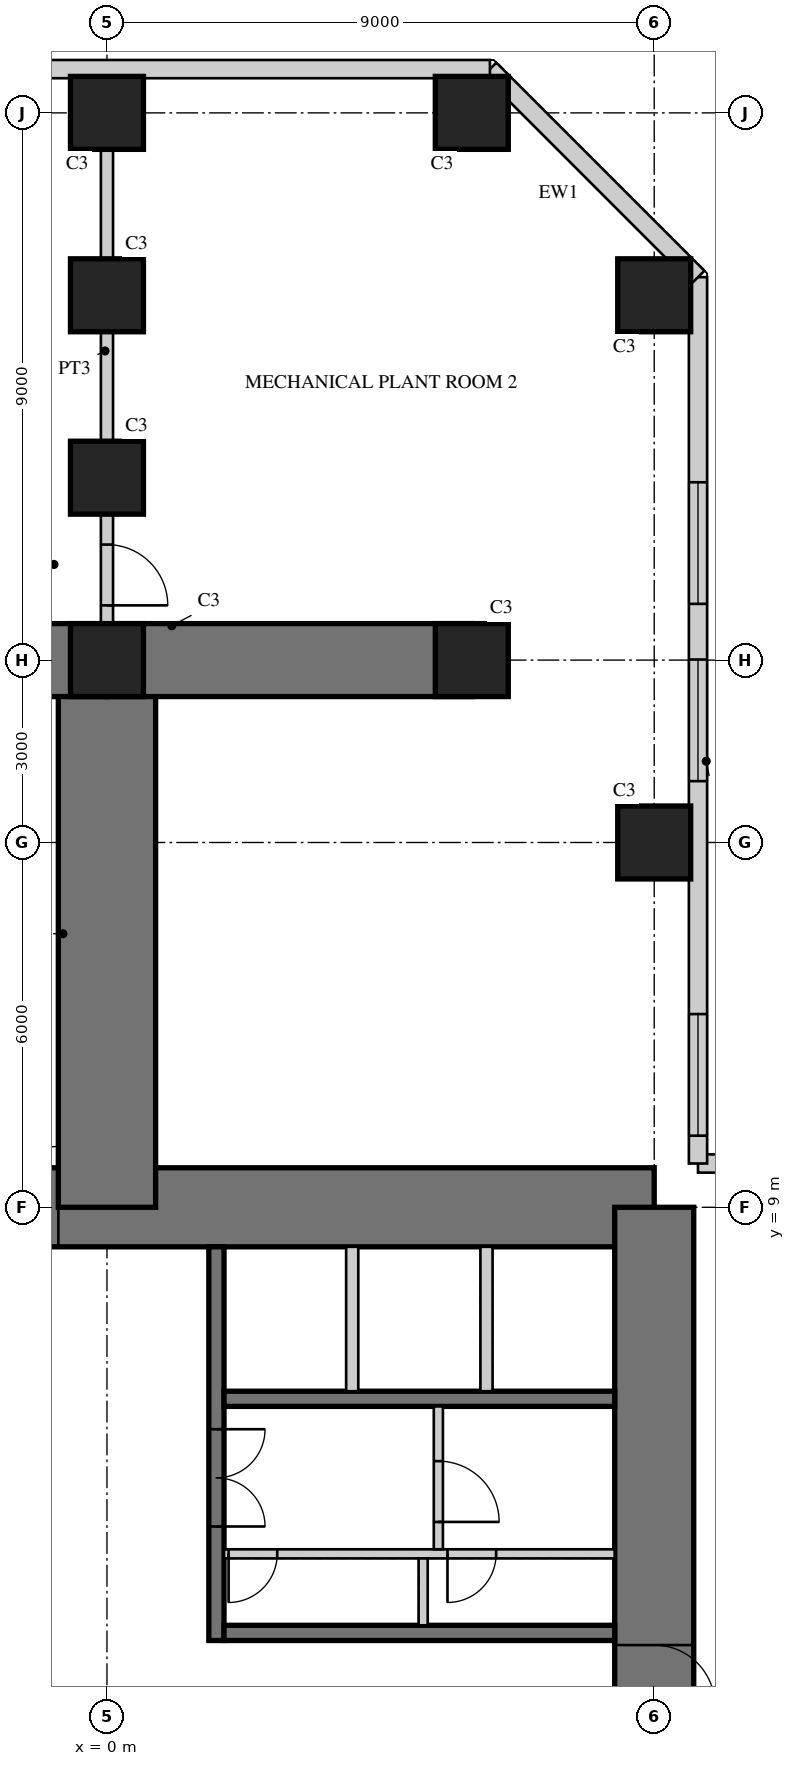
"""IFC4 building model, lengths in metres.
Left out: names, types, materials, properties, quantities, classifications, styles, units other than length and angle.
Written with IfcOpenShell. Run it as: python <this file> out.ifc"""

import sys

from ifc_helpers import new_model, si_unit, direction, frame, frame_2d, origin, origin_2d, place, context, subcontext, project, spatial, rectangle, hollow_rectangle, extrude, element, fill, save


model = new_model("IFC4")
c1 = context("Model", 3, precision=1e-05, world=origin(), true_north=direction((0.0, 1.0)))
c2 = subcontext(c1, "Body", "Model", "MODEL_VIEW")
j1 = project(units=[si_unit("LENGTHUNIT", "METRE"), si_unit("PLANEANGLEUNIT", "RADIAN")], contexts=[c1])
p1 = place(None, origin())
s1 = spatial("IfcSite", under=j1, at=p1, CompositionType="ELEMENT")
p2 = place(p1, origin())
s2 = spatial("IfcBuilding", under=s1, at=p2, CompositionType="ELEMENT")
p3 = place(p2, frame((0.0, 0.0, 18.5)))
s3 = spatial("IfcBuildingStorey", under=s2, at=p3, CompositionType="ELEMENT", Elevation=18.5)
p4 = place(p3, frame((9.0, 9.0, 0.0), z_axis=(0.0, 0.0, 1.0), x_axis=(-1.0, 0.0, 0.0)))
e1 = element("IfcWall", 1, at=p4, inside=s3, PredefinedType="SHEAR", context=c2, shape_type="SweptSolid", body=[
    extrude(rectangle(XDim=18.0, YDim=1.3, at=frame_2d((9.0, 0.0))), origin(), (0.0, 0.0, 1.0), 5.0),
])
p5 = place(p4, frame((9.8, 0.0, 0.0)))
e2 = element("IfcOpeningElement", 2, at=p5, cuts=e1, PredefinedType="OPENING", context=c2, shape_type="SweptSolid", body=[
    extrude(rectangle(XDim=1.0, YDim=2.4, at=frame_2d((0.5, 1.2))), frame((0.0, 0.66, 0.0), z_axis=(0.0, -1.0, 0.0), x_axis=(1.0, 0.0, 0.0)), (0.0, 0.0, 1.0), 1.32),
])
p6 = place(p3, frame((9.0, -9.0, 0.0), z_axis=(0.0, 0.0, 1.0), x_axis=(0.0, 1.0, 0.0)))
e3 = element("IfcWall", 3, at=p6, inside=s3, PredefinedType="SHEAR", context=c2, shape_type="SweptSolid", body=[
    extrude(rectangle(XDim=18.0, YDim=1.3, at=frame_2d((9.0, 0.0))), origin(), (0.0, 0.0, 1.0), 5.0),
])
p7 = place(p6, frame((9.8, 0.0, 0.0)))
e4 = element("IfcOpeningElement", 4, at=p7, cuts=e3, PredefinedType="OPENING", context=c2, shape_type="SweptSolid", body=[
    extrude(rectangle(XDim=1.0, YDim=2.4, at=frame_2d((0.5, 1.2))), frame((0.0, 0.66, 0.0), z_axis=(0.0, -1.0, 0.0), x_axis=(1.0, 0.0, 0.0)), (0.0, 0.0, 1.0), 1.32),
])
p8 = place(p3, frame((1.8, 1.875, 0.0), z_axis=(0.0, 0.0, 1.0), x_axis=(0.0, 1.0, 0.0)))
e5 = element("IfcWall", 5, at=p8, inside=s3, PredefinedType="SHEAR", context=c2, shape_type="SweptSolid", body=[
    extrude(rectangle(XDim=6.475, YDim=0.25, at=frame_2d((3.238, 0.0))), origin(), (0.0, 0.0, 1.0), 5.0),
])
p9 = place(p8, frame((1.875, 0.0, 0.0)))
e6 = element("IfcOpeningElement", 6, at=p9, cuts=e5, PredefinedType="OPENING", context=c2, shape_type="SweptSolid", body=[
    extrude(rectangle(XDim=1.6, YDim=2.4, at=frame_2d((0.8, 1.2))), frame((0.0, 0.135, 0.0), z_axis=(0.0, -1.0, 0.0), x_axis=(1.0, 0.0, 0.0)), (0.0, 0.0, 1.0), 0.27),
])
for number, where, z_axis, x_axis in (
    (7, (1.925, 2.0, 0.0), (0.0, 0.0, 1.0), (1.0, 0.0, 0.0)),
    (8, (1.925, 5.85, 0.0), (0.0, 0.0, 1.0), (1.0, 0.0, 0.0)),
):
    element("IfcWall", number, at=place(p3, frame(where, z_axis=z_axis, x_axis=x_axis)), inside=s3, PredefinedType="SHEAR", context=c2, shape_type="SweptSolid", body=[
        extrude(rectangle(XDim=6.425, YDim=0.25, at=frame_2d((3.212, 0.0))), origin(), (0.0, 0.0, 1.0), 5.0),
    ])
p10 = place(p3, frame((1.925, 3.3, 0.0), z_axis=(0.0, 0.0, 1.0), x_axis=(1.0, 0.0, 0.0)))
e9 = element("IfcWall", 9, at=p10, inside=s3, PredefinedType="PARTITIONING", context=c2, shape_type="SweptSolid", body=[
    extrude(rectangle(XDim=6.425, YDim=0.15, at=frame_2d((3.212, 0.0))), origin(), (0.0, 0.0, 1.0), 5.0),
])
p11 = place(p10, frame((0.075, 0.0, 0.0)))
e10 = element("IfcOpeningElement", 10, at=p11, cuts=e9, PredefinedType="OPENING", context=c2, shape_type="SweptSolid", body=[
    extrude(rectangle(XDim=0.8, YDim=2.1, at=frame_2d((0.4, 1.05))), frame((0.0, 0.085, 0.0), z_axis=(0.0, -1.0, 0.0), x_axis=(1.0, 0.0, 0.0)), (0.0, 0.0, 1.0), 0.17),
])
p12 = place(p10, frame((3.675, 0.0, 0.0)))
e11 = element("IfcOpeningElement", 11, at=p12, cuts=e9, PredefinedType="OPENING", context=c2, shape_type="SweptSolid", body=[
    extrude(rectangle(XDim=0.8, YDim=2.1, at=frame_2d((0.4, 1.05))), frame((0.0, 0.085, 0.0), z_axis=(0.0, -1.0, 0.0), x_axis=(1.0, 0.0, 0.0)), (0.0, 0.0, 1.0), 0.17),
])
p13 = place(p3, frame((5.2, 2.125, 0.0), z_axis=(0.0, 0.0, 1.0), x_axis=(0.0, 1.0, 0.0)))
e12 = element("IfcWall", 12, at=p13, inside=s3, PredefinedType="PARTITIONING", context=c2, shape_type="SweptSolid", body=[
    extrude(rectangle(XDim=1.1, YDim=0.15, at=frame_2d((0.55, 0.0))), origin(), (0.0, 0.0, 1.0), 5.0),
])
for number, where, z_axis, x_axis in (
    (13, (4.033, 5.975, 0.0), (0.0, 0.0, 1.0), (0.0, 1.0, 0.0)),
    (14, (6.242, 5.975, 0.0), (0.0, 0.0, 1.0), (0.0, 1.0, 0.0)),
):
    element("IfcWall", number, at=place(p3, frame(where, z_axis=z_axis, x_axis=x_axis)), inside=s3, PredefinedType="PARTITIONING", context=c2, shape_type="SweptSolid", body=[
        extrude(rectangle(XDim=2.375, YDim=0.2, at=frame_2d((1.188, 0.0))), origin(), (0.0, 0.0, 1.0), 5.0),
    ])
p14 = place(p3, frame((0.0, 9.0, 0.0), z_axis=(0.0, 0.0, 1.0), x_axis=(0.0, 1.0, 0.0)))
e15 = element("IfcWall", 15, at=p14, inside=s3, PredefinedType="SHEAR", context=c2, shape_type="SweptSolid", body=[
    extrude(rectangle(XDim=9.0, YDim=1.6, at=frame_2d((4.5, 0.0))), origin(), (0.0, 0.0, 1.0), 5.0),
])
for number, where, z_axis, x_axis in (
    (16, (0.0, 18.0, 0.0), (0.0, 0.0, 1.0), (-1.0, 0.0, 0.0)),
    (17, (0.0, 18.0, 0.0), (0.0, 0.0, 1.0), (1.0, 0.0, 0.0)),
):
    element("IfcWall", number, at=place(p3, frame(where, z_axis=z_axis, x_axis=x_axis)), inside=s3, PredefinedType="SHEAR", context=c2, shape_type="SweptSolid", body=[
        extrude(rectangle(XDim=6.0, YDim=1.2, at=frame_2d((3.0, 0.0))), origin(), (0.0, 0.0, 1.0), 5.0),
    ])
for number, where, z_axis, x_axis in (
    (18, (9.0, 15.0, 0.0), (0.0, 0.0, 1.0), (1.0, 0.0, 0.0)),
    (19, (9.0, 24.0, 0.0), (0.0, 0.0, 1.0), (1.0, 0.0, 0.0)),
    (20, (6.0, 27.0, 0.0), (0.0, 0.0, 1.0), (1.0, 0.0, 0.0)),
    (21, (0.0, 27.0, 0.0), (0.0, 0.0, 1.0), (1.0, 0.0, 0.0)),
    (22, (6.0, 18.0, 0.0), (0.0, 0.0, 1.0), (1.0, 0.0, 0.0)),
    (23, (0.0, 18.0, 0.0), (0.0, 0.0, 1.0), (1.0, 0.0, 0.0)),
    (24, (0.0, 21.0, 0.0), (0.0, 0.0, 1.0), (1.0, 0.0, 0.0)),
    (25, (0.0, 24.0, 0.0), (0.0, 0.0, 1.0), (1.0, 0.0, 0.0)),
):
    element("IfcColumn", number, at=place(p3, frame(where, z_axis=z_axis, x_axis=x_axis)), inside=s3, PredefinedType="COLUMN", context=c2, shape_type="SweptSolid", body=[
        extrude(rectangle(XDim=1.2, YDim=1.2, at=origin_2d()), origin(), (0.0, 0.0, 1.0), 5.0),
    ])
p15 = place(p3, frame((24.298, 9.72, 0.0), z_axis=(0.0, 0.0, 1.0), x_axis=(-1.0, 0.0, 0.0)))
e26 = element("IfcWall", 26, at=p15, inside=s3, PredefinedType="SOLIDWALL", context=c2, shape_type="SweptSolid", body=[
    extrude(rectangle(XDim=14.578, YDim=0.3, at=frame_2d((7.289, 0.0))), origin(), (0.0, 0.0, 1.0), 4.8),
])
p16 = place(p15, frame((3.374, 0.0, 0.8)))
e27 = element("IfcOpeningElement", 27, at=p16, cuts=e26, PredefinedType="OPENING", context=c2, shape_type="SweptSolid", body=[
    extrude(rectangle(XDim=2.0, YDim=2.5, at=frame_2d((1.0, 1.25))), frame((0.0, 0.16, 0.0), z_axis=(0.0, -1.0, 0.0), x_axis=(1.0, 0.0, 0.0)), (0.0, 0.0, 1.0), 0.32),
])
p17 = place(p15, frame((12.12, 0.0, 0.8)))
e28 = element("IfcOpeningElement", 28, at=p17, cuts=e26, PredefinedType="OPENING", context=c2, shape_type="SweptSolid", body=[
    extrude(rectangle(XDim=2.0, YDim=2.5, at=frame_2d((1.0, 1.25))), frame((0.0, 0.16, 0.0), z_axis=(0.0, -1.0, 0.0), x_axis=(1.0, 0.0, 0.0)), (0.0, 0.0, 1.0), 0.32),
])
p18 = place(p3, frame((9.72, 9.72, 0.0), z_axis=(0.0, 0.0, 1.0), x_axis=(0.0, 1.0, 0.0)))
e29 = element("IfcWall", 29, at=p18, inside=s3, PredefinedType="SOLIDWALL", context=c2, shape_type="SweptSolid", body=[
    extrude(rectangle(XDim=14.578, YDim=0.3, at=frame_2d((7.289, 0.0))), origin(), (0.0, 0.0, 1.0), 4.8),
])
p19 = place(p18, frame((0.458, 0.0, 0.8)))
e30 = element("IfcOpeningElement", 30, at=p19, cuts=e29, PredefinedType="OPENING", context=c2, shape_type="SweptSolid", body=[
    extrude(rectangle(XDim=2.0, YDim=2.5, at=frame_2d((1.0, 1.25))), frame((0.0, 0.16, 0.0), z_axis=(0.0, -1.0, 0.0), x_axis=(1.0, 0.0, 0.0)), (0.0, 0.0, 1.0), 0.32),
])
p20 = place(p18, frame((6.289, 0.0, 0.8)))
e31 = element("IfcOpeningElement", 31, at=p20, cuts=e29, PredefinedType="OPENING", context=c2, shape_type="SweptSolid", body=[
    extrude(rectangle(XDim=2.0, YDim=2.5, at=frame_2d((1.0, 1.25))), frame((0.0, 0.16, 0.0), z_axis=(0.0, -1.0, 0.0), x_axis=(1.0, 0.0, 0.0)), (0.0, 0.0, 1.0), 0.32),
])
p21 = place(p18, frame((9.205, 0.0, 0.8)))
e32 = element("IfcOpeningElement", 32, at=p21, cuts=e29, PredefinedType="OPENING", context=c2, shape_type="SweptSolid", body=[
    extrude(rectangle(XDim=2.0, YDim=2.5, at=frame_2d((1.0, 1.25))), frame((0.0, 0.16, 0.0), z_axis=(0.0, -1.0, 0.0), x_axis=(1.0, 0.0, 0.0)), (0.0, 0.0, 1.0), 0.32),
])
p22 = place(p3, frame((9.72, 24.298, 0.0), z_axis=(0.0, 0.0, 1.0), x_axis=(-0.707106781187, 0.707106781187, 0.0)))
e33 = element("IfcWall", 33, at=p22, inside=s3, PredefinedType="SOLIDWALL", context=c2, shape_type="SweptSolid", body=[
    extrude(rectangle(XDim=4.839, YDim=0.3, at=frame_2d((2.419, 0.0))), origin(), (0.0, 0.0, 1.0), 4.8),
])
p23 = place(p3, frame((6.298, 27.72, 0.0), z_axis=(0.0, 0.0, 1.0), x_axis=(-1.0, 0.0, 0.0)))
e34 = element("IfcWall", 34, at=p23, inside=s3, PredefinedType="SOLIDWALL", context=c2, shape_type="SweptSolid", body=[
    extrude(rectangle(XDim=12.597, YDim=0.3, at=frame_2d((6.298, 0.0))), origin(), (0.0, 0.0, 1.0), 4.8),
])
p24 = place(p3, frame((5.45, 3.375, 0.0), z_axis=(0.0, 0.0, 1.0), x_axis=(0.0, 1.0, 0.0)))
e35 = element("IfcWall", 35, at=p24, inside=s3, PredefinedType="PARTITIONING", context=c2, shape_type="SweptSolid", body=[
    extrude(rectangle(XDim=2.35, YDim=0.15, at=frame_2d((1.175, 0.0))), origin(), (0.0, 0.0, 1.0), 4.8),
])
p25 = place(p24, frame((0.45, 0.0, 0.0)))
e36 = element("IfcOpeningElement", 36, at=p25, cuts=e35, PredefinedType="OPENING", context=c2, shape_type="SweptSolid", body=[
    extrude(rectangle(XDim=1.0, YDim=2.1, at=frame_2d((0.5, 1.05))), frame((0.0, 0.085, 0.0), z_axis=(0.0, -1.0, 0.0), x_axis=(1.0, 0.0, 0.0)), (0.0, 0.0, 1.0), 0.17),
])
p26 = place(p3, frame((0.0, 18.0, 0.0), z_axis=(0.0, 0.0, 1.0), x_axis=(0.0, 1.0, 0.0)))
e37 = element("IfcWall", 37, at=p26, inside=s3, PredefinedType="SOLIDWALL", context=c2, shape_type="SweptSolid", body=[
    extrude(rectangle(XDim=3.0, YDim=0.2, at=frame_2d((1.5, 0.0))), origin(), (0.0, 0.0, 1.0), 4.8),
])
p27 = place(p26, frame((0.9, 0.0, 0.0)))
e38 = element("IfcOpeningElement", 38, at=p27, cuts=e37, PredefinedType="OPENING", context=c2, shape_type="SweptSolid", body=[
    extrude(rectangle(XDim=1.0, YDim=2.2, at=frame_2d((0.5, 1.1))), frame((0.0, 0.11, 0.0), z_axis=(0.0, -1.0, 0.0), x_axis=(1.0, 0.0, 0.0)), (0.0, 0.0, 1.0), 0.22),
])
p28 = place(p3, frame((0.0, 21.0, 0.0), z_axis=(0.0, 0.0, 1.0), x_axis=(0.0, 1.0, 0.0)))
e39 = element("IfcWall", 39, at=p28, inside=s3, PredefinedType="SOLIDWALL", context=c2, shape_type="SweptSolid", body=[
    extrude(rectangle(XDim=6.0, YDim=0.2, at=frame_2d((3.0, 0.0))), origin(), (0.0, 0.0, 1.0), 3.8),
])
p29 = place(p19, origin())
e40 = element("IfcWindow", 40, at=p29, inside=s3, PartitioningType="SINGLE_PANEL", PredefinedType="WINDOW", context=c2, shape_type="SweptSolid", body=[
    extrude(hollow_rectangle(XDim=2.0, YDim=2.5, WallThickness=0.06, at=frame_2d((1.0, 1.25))), frame((0.0, 0.03, 0.0), z_axis=(0.0, -1.0, 0.0), x_axis=(1.0, 0.0, 0.0)), (0.0, 0.0, 1.0), 0.06),
    extrude(rectangle(XDim=1.879, YDim=2.379, at=frame_2d((1.0, 1.25))), frame((0.0, 0.03, 0.0), z_axis=(0.0, -1.0, 0.0), x_axis=(1.0, 0.0, 0.0)), (0.0, 0.0, 1.0), 0.06),
])
fill(e30, e40)
p30 = place(p20, origin())
e41 = element("IfcWindow", 41, at=p30, inside=s3, PartitioningType="SINGLE_PANEL", PredefinedType="WINDOW", context=c2, shape_type="SweptSolid", body=[
    extrude(hollow_rectangle(XDim=2.0, YDim=2.5, WallThickness=0.06, at=frame_2d((1.0, 1.25))), frame((0.0, 0.03, 0.0), z_axis=(0.0, -1.0, 0.0), x_axis=(1.0, 0.0, 0.0)), (0.0, 0.0, 1.0), 0.06),
    extrude(rectangle(XDim=1.879, YDim=2.379, at=frame_2d((1.0, 1.25))), frame((0.0, 0.03, 0.0), z_axis=(0.0, -1.0, 0.0), x_axis=(1.0, 0.0, 0.0)), (0.0, 0.0, 1.0), 0.06),
])
fill(e31, e41)
p31 = place(p21, origin())
e42 = element("IfcWindow", 42, at=p31, inside=s3, PartitioningType="SINGLE_PANEL", PredefinedType="WINDOW", context=c2, shape_type="SweptSolid", body=[
    extrude(hollow_rectangle(XDim=2.0, YDim=2.5, WallThickness=0.06, at=frame_2d((1.0, 1.25))), frame((0.0, 0.03, 0.0), z_axis=(0.0, -1.0, 0.0), x_axis=(1.0, 0.0, 0.0)), (0.0, 0.0, 1.0), 0.06),
    extrude(rectangle(XDim=1.879, YDim=2.379, at=frame_2d((1.0, 1.25))), frame((0.0, 0.03, 0.0), z_axis=(0.0, -1.0, 0.0), x_axis=(1.0, 0.0, 0.0)), (0.0, 0.0, 1.0), 0.06),
])
fill(e32, e42)
p32 = place(p25, frame((1.0, 0.0, 0.0), z_axis=(0.0, 0.0, 1.0), x_axis=(-1.0, 0.0, 0.0)))
e43 = element("IfcDoor", 43, at=p32, inside=s3, OperationType="SINGLE_SWING_RIGHT", PredefinedType="DOOR", context=c2, shape_type="SweptSolid", body=[
    extrude(rectangle(XDim=1.0, YDim=2.1, at=frame_2d((0.5, 1.05))), frame((0.0, 0.025, 0.0), z_axis=(0.0, -1.0, 0.0), x_axis=(1.0, 0.0, 0.0)), (0.0, 0.0, 1.0), 0.05),
])
fill(e36, e43)
p33 = place(p27, frame((1.0, 0.0, 0.0), z_axis=(0.0, 0.0, 1.0), x_axis=(-1.0, 0.0, 0.0)))
e44 = element("IfcDoor", 44, at=p33, inside=s3, OperationType="SINGLE_SWING_RIGHT", PredefinedType="DOOR", context=c2, shape_type="SweptSolid", body=[
    extrude(rectangle(XDim=1.0, YDim=2.2, at=frame_2d((0.5, 1.1))), frame((0.0, 0.025, 0.0), z_axis=(0.0, -1.0, 0.0), x_axis=(1.0, 0.0, 0.0)), (0.0, 0.0, 1.0), 0.05),
])
fill(e38, e44)
p34 = place(p5, frame((1.0, 0.0, 0.0), z_axis=(0.0, 0.0, 1.0), x_axis=(-1.0, 0.0, 0.0)))
e45 = element("IfcDoor", 45, at=p34, inside=s3, OperationType="SINGLE_SWING_RIGHT", PredefinedType="DOOR", context=c2, shape_type="SweptSolid", body=[
    extrude(rectangle(XDim=1.0, YDim=2.4, at=frame_2d((0.5, 1.2))), frame((0.0, -0.005, 0.0), z_axis=(0.0, -1.0, 0.0), x_axis=(1.0, 0.0, 0.0)), (0.0, 0.0, 1.0), 0.05),
])
fill(e2, e45)
p35 = place(p7, frame((1.0, 0.0, 0.0), z_axis=(0.0, 0.0, 1.0), x_axis=(-1.0, 0.0, 0.0)))
e46 = element("IfcDoor", 46, at=p35, inside=s3, OperationType="SINGLE_SWING_RIGHT", PredefinedType="DOOR", context=c2, shape_type="SweptSolid", body=[
    extrude(rectangle(XDim=1.0, YDim=2.4, at=frame_2d((0.5, 1.2))), frame((0.0, -0.005, 0.0), z_axis=(0.0, -1.0, 0.0), x_axis=(1.0, 0.0, 0.0)), (0.0, 0.0, 1.0), 0.05),
])
fill(e4, e46)
p36 = place(p9, frame((1.6, 0.0, 0.0), z_axis=(0.0, 0.0, 1.0), x_axis=(-1.0, 0.0, 0.0)))
e47 = element("IfcDoor", 47, at=p36, inside=s3, OperationType="DOUBLE_DOOR_SINGLE_SWING", PredefinedType="DOOR", context=c2, shape_type="SweptSolid", body=[
    extrude(rectangle(XDim=1.6, YDim=2.4, at=frame_2d((0.8, 1.2))), frame((0.0, 0.025, 0.0), z_axis=(0.0, -1.0, 0.0), x_axis=(1.0, 0.0, 0.0)), (0.0, 0.0, 1.0), 0.05),
])
fill(e6, e47)
p37 = place(p11, frame((0.8, 0.0, 0.0), z_axis=(0.0, 0.0, 1.0), x_axis=(-1.0, 0.0, 0.0)))
e48 = element("IfcDoor", 48, at=p37, inside=s3, OperationType="SINGLE_SWING_RIGHT", PredefinedType="DOOR", context=c2, shape_type="SweptSolid", body=[
    extrude(rectangle(XDim=0.8, YDim=2.1, at=frame_2d((0.4, 1.05))), frame((0.0, 0.025, 0.0), z_axis=(0.0, -1.0, 0.0), x_axis=(1.0, 0.0, 0.0)), (0.0, 0.0, 1.0), 0.05),
])
fill(e10, e48)
p38 = place(p12, frame((0.8, 0.0, 0.0), z_axis=(0.0, 0.0, 1.0), x_axis=(-1.0, 0.0, 0.0)))
e49 = element("IfcDoor", 49, at=p38, inside=s3, OperationType="SINGLE_SWING_RIGHT", PredefinedType="DOOR", context=c2, shape_type="SweptSolid", body=[
    extrude(rectangle(XDim=0.8, YDim=2.1, at=frame_2d((0.4, 1.05))), frame((0.0, 0.025, 0.0), z_axis=(0.0, -1.0, 0.0), x_axis=(1.0, 0.0, 0.0)), (0.0, 0.0, 1.0), 0.05),
])
fill(e11, e49)
save(model, sys.argv[1])
